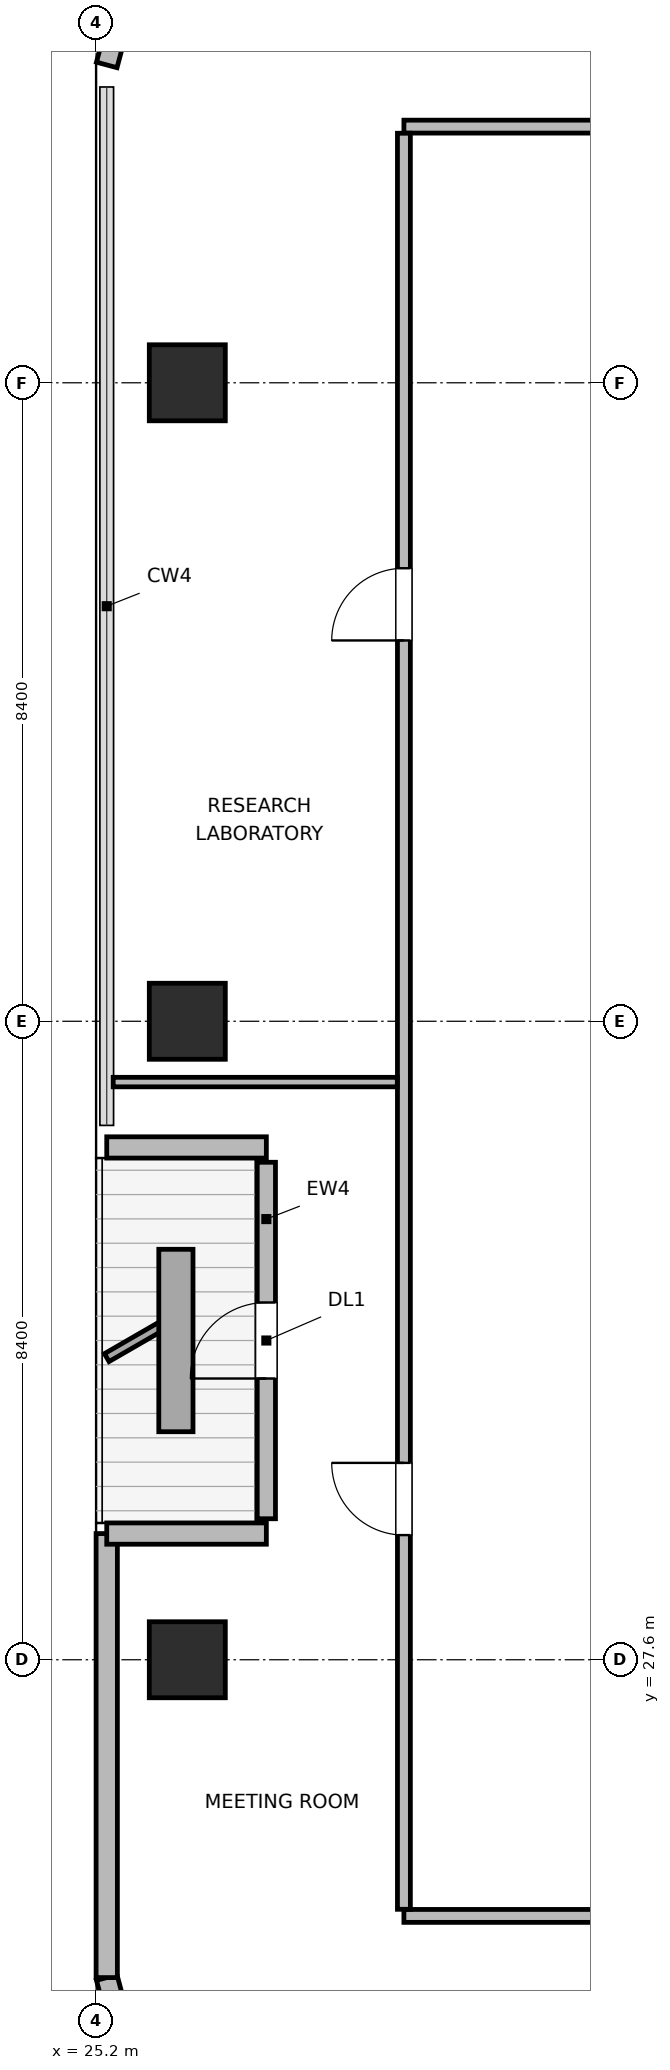
"""IFC4 building model, lengths in metres.
Left out: names, types, materials, properties, quantities, classifications, styles, units other than length and angle.
Written with IfcOpenShell. Run it as: python <this file> out.ifc"""

import sys

from ifc_helpers import new_model, si_unit, direction, frame, frame_2d, origin, origin_2d, place, context, subcontext, project, spatial, rectangle, extrude, element, fill, save


model = new_model("IFC4")
c1 = context("Model", 3, precision=1e-05, world=origin(), true_north=direction((0.0, 1.0)))
c2 = subcontext(c1, "Body", "Model", "MODEL_VIEW")
j1 = project(units=[si_unit("LENGTHUNIT", "METRE"), si_unit("PLANEANGLEUNIT", "RADIAN")], contexts=[c1])
p1 = place(None, origin())
s1 = spatial("IfcSite", under=j1, at=p1, CompositionType="ELEMENT")
p2 = place(p1, origin())
s2 = spatial("IfcBuilding", under=s1, at=p2, CompositionType="ELEMENT")
p3 = place(p2, frame((0.0, 0.0, 286.2)))
s3 = spatial("IfcBuildingStorey", under=s2, at=p3, CompositionType="ELEMENT", Elevation=286.2)
for number, where, z_axis, x_axis in (
    (1, (26.4, 27.6, 0.0), (0.0, 0.0, 1.0), (1.0, 0.0, 0.0)),
    (2, (26.4, 36.0, 0.0), (0.0, 0.0, 1.0), (1.0, 0.0, 0.0)),
    (3, (26.4, 44.4, 0.0), (0.0, 0.0, 1.0), (1.0, 0.0, 0.0)),
):
    element("IfcColumn", number, at=place(p3, frame(where, z_axis=z_axis, x_axis=x_axis)), inside=s3, PredefinedType="COLUMN", context=c2, shape_type="SweptSolid", body=[
        extrude(rectangle(XDim=1.0, YDim=1.0, at=origin_2d()), origin(), (0.0, 0.0, 1.0), 3.9),
    ])
p4 = place(p3, frame((25.969, 21.073, 0.0), z_axis=(0.0, 0.0, 1.0), x_axis=(-0.258751159445, 0.965944013639, 0.0)))
e4 = element("IfcWall", 4, at=p4, inside=s3, PredefinedType="SOLIDWALL", context=c2, shape_type="SweptSolid", body=[
    extrude(rectangle(XDim=2.429, YDim=0.28, at=frame_2d((1.214, 0.0))), origin(), (0.0, 0.0, 1.0), 3.68),
])
p5 = place(p3, frame((25.34, 23.418, 0.0), z_axis=(0.0, 0.0, 1.0), x_axis=(0.0, 1.0, 0.0)))
e5 = element("IfcWall", 5, at=p5, inside=s3, PredefinedType="SOLIDWALL", context=c2, shape_type="SweptSolid", body=[
    extrude(rectangle(XDim=5.842, YDim=0.28, at=frame_2d((2.921, 0.0))), origin(), (0.0, 0.0, 1.0), 3.68),
])
p6 = place(p3, frame((25.34, 29.26, 0.0), z_axis=(0.0, 0.0, 1.0), x_axis=(1.0, 0.0, 0.0)))
e6 = element("IfcWall", 6, at=p6, inside=s3, PredefinedType="SOLIDWALL", context=c2, shape_type="SweptSolid", body=[
    extrude(rectangle(XDim=2.1, YDim=0.28, at=frame_2d((1.05, 0.0))), origin(), (0.0, 0.0, 1.0), 3.126),
])
p7 = place(p3, frame((27.44, 29.455, 0.0), z_axis=(0.0, 0.0, 1.0), x_axis=(0.0, 1.0, 0.0)))
e7 = element("IfcWall", 7, at=p7, inside=s3, PredefinedType="SOLIDWALL", context=c2, shape_type="SweptSolid", body=[
    extrude(rectangle(XDim=4.69, YDim=0.24, at=frame_2d((2.345, 0.0))), origin(), (0.0, 0.0, 1.0), 3.311),
])
p8 = place(p7, frame((1.845, 0.0, 0.0)))
e8 = element("IfcOpeningElement", 8, at=p8, cuts=e7, PredefinedType="OPENING", context=c2, shape_type="SweptSolid", body=[
    extrude(rectangle(XDim=1.0, YDim=2.02, at=frame_2d((0.5, 1.01))), frame((0.0, 0.13, 0.0), z_axis=(0.0, -1.0, 0.0), x_axis=(1.0, 0.0, 0.0)), (0.0, 0.0, 1.0), 0.26),
])
p9 = place(p3, frame((27.44, 34.34, 0.0), z_axis=(0.0, 0.0, 1.0), x_axis=(-1.0, 0.0, 0.0)))
e9 = element("IfcWall", 9, at=p9, inside=s3, PredefinedType="SOLIDWALL", context=c2, shape_type="SweptSolid", body=[
    extrude(rectangle(XDim=2.1, YDim=0.28, at=frame_2d((1.05, 0.0))), origin(), (0.0, 0.0, 1.0), 3.126),
])
p10 = place(p3, frame((25.34, 48.582, 0.0), z_axis=(0.0, 0.0, 1.0), x_axis=(0.258751159445, 0.965944013639, 0.0)))
e10 = element("IfcWall", 10, at=p10, inside=s3, PredefinedType="SOLIDWALL", context=c2, shape_type="SweptSolid", body=[
    extrude(rectangle(XDim=2.429, YDim=0.28, at=frame_2d((1.214, 0.0))), origin(), (0.0, 0.0, 1.0), 3.68),
])
p11 = place(p3, frame((29.25, 24.23, 0.0), z_axis=(0.0, 0.0, 1.0), x_axis=(1.0, 0.0, 0.0)))
e11 = element("IfcWall", 11, at=p11, inside=s3, PredefinedType="PARTITIONING", context=c2, shape_type="SweptSolid", body=[
    extrude(rectangle(XDim=34.35, YDim=0.17, at=frame_2d((17.175, 0.0))), origin(), (0.0, 0.0, 1.0), 3.68),
])
p12 = place(p11, frame((5.9, 0.0, 0.0)))
e12 = element("IfcOpeningElement", 12, at=p12, cuts=e11, PredefinedType="OPENING", context=c2, shape_type="SweptSolid", body=[
    extrude(rectangle(XDim=0.95, YDim=2.04, at=frame_2d((0.475, 1.02))), frame((0.0, 0.095, 0.0), z_axis=(0.0, -1.0, 0.0), x_axis=(1.0, 0.0, 0.0)), (0.0, 0.0, 1.0), 0.19),
])
p13 = place(p11, frame((23.075, 0.0, 0.0)))
e13 = element("IfcOpeningElement", 13, at=p13, cuts=e11, PredefinedType="OPENING", context=c2, shape_type="SweptSolid", body=[
    extrude(rectangle(XDim=0.95, YDim=2.04, at=frame_2d((0.475, 1.02))), frame((0.0, 0.095, 0.0), z_axis=(0.0, -1.0, 0.0), x_axis=(1.0, 0.0, 0.0)), (0.0, 0.0, 1.0), 0.19),
])
p14 = place(p3, frame((29.25, 47.77, 0.0), z_axis=(0.0, 0.0, 1.0), x_axis=(1.0, 0.0, 0.0)))
e14 = element("IfcWall", 14, at=p14, inside=s3, PredefinedType="PARTITIONING", context=c2, shape_type="SweptSolid", body=[
    extrude(rectangle(XDim=34.35, YDim=0.17, at=frame_2d((17.175, 0.0))), origin(), (0.0, 0.0, 1.0), 3.68),
])
p15 = place(p14, frame((8.4, 0.0, 0.0)))
e15 = element("IfcOpeningElement", 15, at=p15, cuts=e14, PredefinedType="OPENING", context=c2, shape_type="SweptSolid", body=[
    extrude(rectangle(XDim=0.95, YDim=2.04, at=frame_2d((0.475, 1.02))), frame((0.0, 0.095, 0.0), z_axis=(0.0, -1.0, 0.0), x_axis=(1.0, 0.0, 0.0)), (0.0, 0.0, 1.0), 0.19),
])
p16 = place(p14, frame((25.575, 0.0, 0.0)))
e16 = element("IfcOpeningElement", 16, at=p16, cuts=e14, PredefinedType="OPENING", context=c2, shape_type="SweptSolid", body=[
    extrude(rectangle(XDim=0.95, YDim=2.04, at=frame_2d((0.475, 1.02))), frame((0.0, 0.095, 0.0), z_axis=(0.0, -1.0, 0.0), x_axis=(1.0, 0.0, 0.0)), (0.0, 0.0, 1.0), 0.19),
])
p17 = place(p3, frame((29.25, 24.317, 0.0), z_axis=(0.0, 0.0, 1.0), x_axis=(0.0, 1.0, 0.0)))
e17 = element("IfcWall", 17, at=p17, inside=s3, PredefinedType="PARTITIONING", context=c2, shape_type="SweptSolid", body=[
    extrude(rectangle(XDim=23.366, YDim=0.17, at=frame_2d((11.683, 0.0))), origin(), (0.0, 0.0, 1.0), 3.68),
])
p18 = place(p17, frame((4.923, 0.0, 0.0)))
e18 = element("IfcOpeningElement", 18, at=p18, cuts=e17, PredefinedType="OPENING", context=c2, shape_type="SweptSolid", body=[
    extrude(rectangle(XDim=0.95, YDim=2.04, at=frame_2d((0.475, 1.02))), frame((0.0, 0.095, 0.0), z_axis=(0.0, -1.0, 0.0), x_axis=(1.0, 0.0, 0.0)), (0.0, 0.0, 1.0), 0.19),
])
p19 = place(p17, frame((16.693, 0.0, 0.0)))
e19 = element("IfcOpeningElement", 19, at=p19, cuts=e17, PredefinedType="OPENING", context=c2, shape_type="SweptSolid", body=[
    extrude(rectangle(XDim=0.95, YDim=2.04, at=frame_2d((0.475, 1.02))), frame((0.0, 0.095, 0.0), z_axis=(0.0, -1.0, 0.0), x_axis=(1.0, 0.0, 0.0)), (0.0, 0.0, 1.0), 0.19),
])
p20 = place(p3, frame((25.425, 35.2, 0.0), z_axis=(0.0, 0.0, 1.0), x_axis=(1.0, 0.0, 0.0)))
e20 = element("IfcWall", 20, at=p20, inside=s3, PredefinedType="PARTITIONING", context=c2, shape_type="SweptSolid", body=[
    extrude(rectangle(XDim=3.738, YDim=0.125, at=frame_2d((1.869, 0.0))), origin(), (0.0, 0.0, 1.0), 3.68),
])
p21 = place(p8, origin())
e21 = element("IfcDoor", 21, at=p21, inside=s3, OperationType="SINGLE_SWING_LEFT", PredefinedType="DOOR", context=c2, shape_type="SweptSolid", body=[
    extrude(rectangle(XDim=1.0, YDim=2.02, at=frame_2d((0.5, 1.01))), frame((0.0, 0.025, 0.0), z_axis=(0.0, -1.0, 0.0), x_axis=(1.0, 0.0, 0.0)), (0.0, 0.0, 1.0), 0.05),
])
fill(e8, e21)
p22 = place(p18, origin())
e22 = element("IfcDoor", 22, at=p22, inside=s3, OperationType="SINGLE_SWING_RIGHT", PredefinedType="DOOR", context=c2, shape_type="SweptSolid", body=[
    extrude(rectangle(XDim=0.95, YDim=2.04, at=frame_2d((0.475, 1.02))), frame((0.0, 0.025, 0.0), z_axis=(0.0, -1.0, 0.0), x_axis=(1.0, 0.0, 0.0)), (0.0, 0.0, 1.0), 0.05),
])
fill(e18, e22)
p23 = place(p19, origin())
e23 = element("IfcDoor", 23, at=p23, inside=s3, OperationType="SINGLE_SWING_LEFT", PredefinedType="DOOR", context=c2, shape_type="SweptSolid", body=[
    extrude(rectangle(XDim=0.95, YDim=2.04, at=frame_2d((0.475, 1.02))), frame((0.0, 0.025, 0.0), z_axis=(0.0, -1.0, 0.0), x_axis=(1.0, 0.0, 0.0)), (0.0, 0.0, 1.0), 0.05),
])
fill(e19, e23)
save(model, sys.argv[1])
